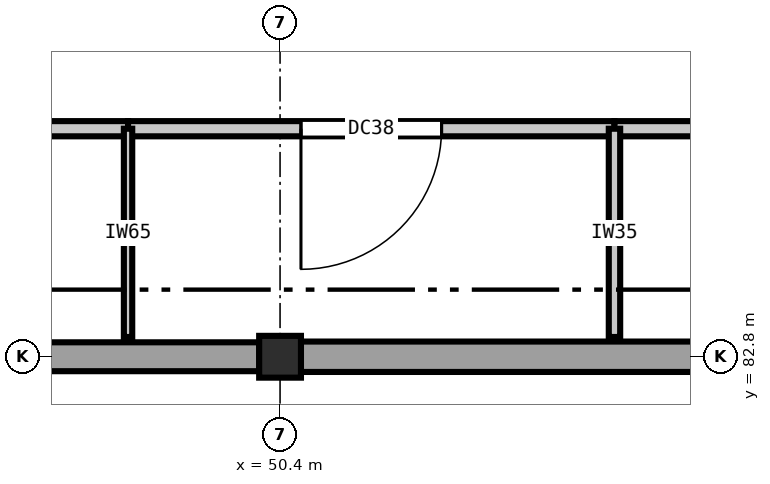
"""IFC4 building model, lengths in metres.
Left out: names, types, materials, properties, quantities, classifications, styles, units other than length and angle.
Written with IfcOpenShell. Run it as: python <this file> out.ifc"""

import sys

from ifc_helpers import new_model, si_unit, direction, frame, frame_2d, origin, origin_2d, place, context, subcontext, project, spatial, rectangle, extrude, element, fill, save


model = new_model("IFC4")
c1 = context("Model", 3, precision=1e-05, world=origin(), true_north=direction((0.0, 1.0)))
c2 = subcontext(c1, "Body", "Model", "MODEL_VIEW")
j1 = project(units=[si_unit("LENGTHUNIT", "METRE"), si_unit("PLANEANGLEUNIT", "RADIAN")], contexts=[c1])
p1 = place(None, origin())
s1 = spatial("IfcSite", under=j1, at=p1, CompositionType="ELEMENT")
p2 = place(p1, origin())
s2 = spatial("IfcBuilding", under=s1, at=p2, CompositionType="ELEMENT")
p3 = place(p2, frame((0.0, 0.0, 16.2)))
s3 = spatial("IfcBuildingStorey", under=s2, at=p3, CompositionType="ELEMENT", Elevation=16.2)
p4 = place(p3, frame((50.4, 82.8, 0.0), z_axis=(0.0, 0.0, 1.0), x_axis=(1.0, 0.0, 0.0)))
e1 = element("IfcColumn", 1, at=p4, inside=s3, PredefinedType="COLUMN", context=c2, shape_type="SweptSolid", body=[
    extrude(rectangle(XDim=0.55, YDim=0.55, at=origin_2d()), origin(), (0.0, 0.0, 1.0), 4.2),
])
p5 = place(p3, frame((58.527, 82.8, 0.0), z_axis=(0.0, 0.0, 1.0), x_axis=(-1.0, 0.0, 0.0)))
e2 = element("IfcWall", 2, at=p5, inside=s3, PredefinedType="SOLIDWALL", context=c2, shape_type="SweptSolid", body=[
    extrude(rectangle(XDim=7.854, YDim=0.4, at=frame_2d((3.927, 0.0))), origin(), (0.0, 0.0, 1.0), 3.48),
])
p6 = place(p3, frame((50.127, 82.8, 0.0), z_axis=(0.0, 0.0, 1.0), x_axis=(-1.0, 0.0, 0.0)))
e3 = element("IfcWall", 3, at=p6, inside=s3, PredefinedType="SOLIDWALL", context=c2, shape_type="SweptSolid", body=[
    extrude(rectangle(XDim=7.854, YDim=0.38, at=frame_2d((3.927, 0.0))), origin(), (0.0, 0.0, 1.0), 3.48),
])
p7 = place(p6, frame((2.827, 0.0, 0.9)))
e4 = element("IfcOpeningElement", 4, at=p7, cuts=e3, PredefinedType="OPENING", context=c2, shape_type="SweptSolid", body=[
    extrude(rectangle(XDim=2.2, YDim=1.95, at=frame_2d((1.1, 0.975))), frame((0.0, 0.2, 0.0), z_axis=(0.0, -1.0, 0.0), x_axis=(1.0, 0.0, 0.0)), (0.0, 0.0, 1.0), 0.4),
])
p8 = place(p3, frame((40.0, 85.8, 0.0), z_axis=(0.0, 0.0, 1.0), x_axis=(1.0, 0.0, 0.0)))
e5 = element("IfcWall", 5, at=p8, inside=s3, PredefinedType="PARTITIONING", context=c2, shape_type="SweptSolid", body=[
    extrude(rectangle(XDim=8.4, YDim=0.2, at=frame_2d((4.2, 0.0))), origin(), (0.0, 0.0, 1.0), 3.89),
])
p9 = place(p8, frame((3.35, 0.0, 0.0)))
e6 = element("IfcOpeningElement", 6, at=p9, cuts=e5, PredefinedType="OPENING", context=c2, shape_type="SweptSolid", body=[
    extrude(rectangle(XDim=1.7, YDim=2.3, at=frame_2d((0.85, 1.15))), frame((0.0, 0.11, 0.0), z_axis=(0.0, -1.0, 0.0), x_axis=(1.0, 0.0, 0.0)), (0.0, 0.0, 1.0), 0.22),
])
p10 = place(p3, frame((48.4, 85.8, 0.0), z_axis=(0.0, 0.0, 1.0), x_axis=(1.0, 0.0, 0.0)))
e7 = element("IfcWall", 7, at=p10, inside=s3, PredefinedType="PARTITIONING", context=c2, shape_type="SweptSolid", body=[
    extrude(rectangle(XDim=6.4, YDim=0.2, at=frame_2d((3.2, 0.0))), origin(), (0.0, 0.0, 1.0), 3.89),
])
p11 = place(p10, frame((2.275, 0.0, 0.0)))
e8 = element("IfcOpeningElement", 8, at=p11, cuts=e7, PredefinedType="OPENING", context=c2, shape_type="SweptSolid", body=[
    extrude(rectangle(XDim=1.85, YDim=2.3, at=frame_2d((0.925, 1.15))), frame((0.0, 0.11, 0.0), z_axis=(0.0, -1.0, 0.0), x_axis=(1.0, 0.0, 0.0)), (0.0, 0.0, 1.0), 0.22),
])
p12 = place(p3, frame((54.8, 85.8, 0.0), z_axis=(0.0, 0.0, 1.0), x_axis=(1.0, 0.0, 0.0)))
e9 = element("IfcWall", 9, at=p12, inside=s3, PredefinedType="PARTITIONING", context=c2, shape_type="SweptSolid", body=[
    extrude(rectangle(XDim=4.0, YDim=0.2, at=frame_2d((2.0, 0.0))), origin(), (0.0, 0.0, 1.0), 3.89),
])
p13 = place(p12, frame((1.375, 0.0, 0.0)))
e10 = element("IfcOpeningElement", 10, at=p13, cuts=e9, PredefinedType="OPENING", context=c2, shape_type="SweptSolid", body=[
    extrude(rectangle(XDim=1.25, YDim=2.15, at=frame_2d((0.625, 1.075))), frame((0.0, 0.11, 0.0), z_axis=(0.0, -1.0, 0.0), x_axis=(1.0, 0.0, 0.0)), (0.0, 0.0, 1.0), 0.22),
])
p14 = place(p3, frame((48.4, 83.06, 0.0), z_axis=(0.0, 0.0, 1.0), x_axis=(0.0, 1.0, 0.0)))
e11 = element("IfcWall", 11, at=p14, inside=s3, PredefinedType="PARTITIONING", context=c2, shape_type="SweptSolid", body=[
    extrude(rectangle(XDim=2.74, YDim=0.11, at=frame_2d((1.37, 0.0))), origin(), (0.0, 0.0, 1.0), 3.89),
])
p15 = place(p3, frame((54.8, 83.06, 0.0), z_axis=(0.0, 0.0, 1.0), x_axis=(0.0, 1.0, 0.0)))
e12 = element("IfcWall", 12, at=p15, inside=s3, PredefinedType="PARTITIONING", context=c2, shape_type="SweptSolid", body=[
    extrude(rectangle(XDim=2.74, YDim=0.15, at=frame_2d((1.37, 0.0))), origin(), (0.0, 0.0, 1.0), 3.89),
])
p16 = place(p11, frame((1.85, 0.0, 0.0), z_axis=(0.0, 0.0, 1.0), x_axis=(-1.0, 0.0, 0.0)))
e13 = element("IfcDoor", 13, at=p16, inside=s3, OperationType="SINGLE_SWING_RIGHT", PredefinedType="DOOR", context=c2, shape_type="SweptSolid", body=[
    extrude(rectangle(XDim=1.85, YDim=2.3, at=frame_2d((0.925, 1.15))), frame((0.0, 0.025, 0.0), z_axis=(0.0, -1.0, 0.0), x_axis=(1.0, 0.0, 0.0)), (0.0, 0.0, 1.0), 0.05),
])
fill(e8, e13)
save(model, sys.argv[1])
